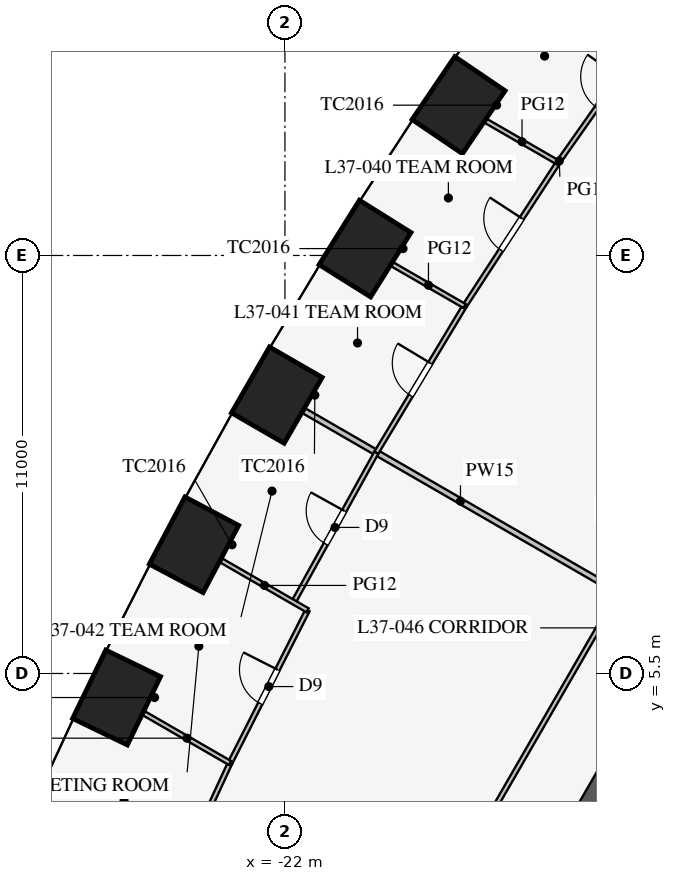
"""IFC4 building model, lengths in metres.
Left out: names, types, materials, properties, quantities, classifications, styles, units other than length and angle.
Written with IfcOpenShell. Run it as: python <this file> out.ifc"""

import sys

from ifc_helpers import new_model, si_unit, direction, frame, frame_2d, origin, origin_2d, place, context, subcontext, project, spatial, rectangle, extrude, element, fill, save


model = new_model("IFC4")
c1 = context("Model", 3, precision=1e-05, world=origin(), true_north=direction((0.0, 1.0)))
c2 = subcontext(c1, "Body", "Model", "MODEL_VIEW")
j1 = project(units=[si_unit("LENGTHUNIT", "METRE"), si_unit("PLANEANGLEUNIT", "RADIAN")], contexts=[c1])
p1 = place(None, origin())
s1 = spatial("IfcSite", under=j1, at=p1, CompositionType="ELEMENT")
p2 = place(p1, origin())
s2 = spatial("IfcBuilding", under=s1, at=p2, CompositionType="ELEMENT")
p3 = place(p2, frame((0.0, 0.0, 161.9)))
s3 = spatial("IfcBuildingStorey", under=s2, at=p3, CompositionType="ELEMENT", Elevation=161.9)
for number, where, z_axis, x_axis in (
    (1, (-17.43, 20.456, 0.0), (0.0, 0.0, 1.0), (-0.561, -0.828, 0.0)),
    (2, (-19.893, 16.681, 0.0), (0.0, 0.0, 1.0), (-0.531, -0.847, 0.0)),
    (3, (-22.213, 12.825, 0.0), (0.0, 0.0, 1.0), (-0.5, -0.866, 0.0)),
    (4, (-24.393, 8.887, 0.0), (0.0, 0.0, 1.0), (-0.468, -0.883, 0.0)),
    (5, (-26.43, 4.867, 0.0), (0.0, 0.0, 1.0), (-0.436, -0.9, 0.0)),
):
    element("IfcColumn", number, at=place(p3, frame(where, z_axis=z_axis, x_axis=x_axis)), inside=s3, PredefinedType="COLUMN", context=c2, shape_type="SweptSolid", body=[
        extrude(rectangle(XDim=2.0, YDim=1.6, at=origin_2d()), origin(), (0.0, 0.0, 1.0), 4.2),
    ])
p4 = place(p3, frame((-5.773, 16.0, 0.0), z_axis=(0.0, 0.0, 1.0), x_axis=(-0.500002442456, -0.866023993627, 0.0)))
e6 = element("IfcWall", 6, at=p4, inside=s3, PredefinedType="SHEAR", context=c2, shape_type="SweptSolid", body=[
    extrude(rectangle(XDim=21.939, YDim=0.8, at=frame_2d((10.97, 0.0))), origin(), (0.0, 0.0, 1.0), 4.2),
])
p5 = place(p4, frame((17.27, 0.0, 0.0)))
e7 = element("IfcOpeningElement", 7, at=p5, cuts=e6, PredefinedType="OPENING", context=c2, shape_type="SweptSolid", body=[
    extrude(rectangle(XDim=1.2, YDim=2.1, at=frame_2d((0.6, 1.05))), frame((0.0, 0.41, 0.0), z_axis=(0.0, -1.0, 0.0), x_axis=(1.0, 0.0, 0.0)), (0.0, 0.0, 1.0), 0.82),
])
p6 = place(p4, frame((3.47, 0.0, 0.0)))
e8 = element("IfcOpeningElement", 8, at=p6, cuts=e6, PredefinedType="OPENING", context=c2, shape_type="SweptSolid", body=[
    extrude(rectangle(XDim=1.2, YDim=2.1, at=frame_2d((0.6, 1.05))), frame((0.0, 0.41, 0.0), z_axis=(0.0, -1.0, 0.0), x_axis=(1.0, 0.0, 0.0)), (0.0, 0.0, 1.0), 0.82),
])
p7 = place(p3, frame((-13.268, 7.66, 0.0), z_axis=(0.0, 0.0, 1.0), x_axis=(-0.866013963754, 0.500019814191, 0.0)))
e9 = element("IfcWall", 9, at=p7, inside=s3, PredefinedType="PARTITIONING", context=c2, shape_type="SweptSolid", body=[
    extrude(rectangle(XDim=9.5, YDim=0.15, at=frame_2d((4.75, 0.0))), origin(), (0.0, 0.0, 1.0), 2.8),
])
p8 = place(p3, frame((-0.016, 30.491, 0.0), z_axis=(0.0, 0.0, 1.0), x_axis=(-0.50000091641, -0.866024874695, 0.0)))
e10 = element("IfcWall", 10, at=p8, inside=s3, PredefinedType="PARTITIONING", context=c2, shape_type="SweptSolid", body=[
    extrude(rectangle(XDim=52.796, YDim=0.12, at=frame_2d((26.398, 0.0))), origin(), (0.0, 0.0, 1.0), 2.9),
])
p9 = place(p8, frame((10.2, 0.0, 0.15)))
e11 = element("IfcOpeningElement", 11, at=p9, cuts=e10, PredefinedType="OPENING", context=c2, shape_type="SweptSolid", body=[
    extrude(rectangle(XDim=1.8, YDim=2.1, at=frame_2d((0.9, 1.05))), frame((0.0, 0.07, 0.0), z_axis=(0.0, -1.0, 0.0), x_axis=(1.0, 0.0, 0.0)), (0.0, 0.0, 1.0), 0.14),
])
p10 = place(p8, frame((40.8, 0.0, 0.15)))
e12 = element("IfcOpeningElement", 12, at=p10, cuts=e10, PredefinedType="OPENING", context=c2, shape_type="SweptSolid", body=[
    extrude(rectangle(XDim=1.8, YDim=2.1, at=frame_2d((0.9, 1.05))), frame((0.0, 0.07, 0.0), z_axis=(0.0, -1.0, 0.0), x_axis=(1.0, 0.0, 0.0)), (0.0, 0.0, 1.0), 0.14),
])
p11 = place(p3, frame((-19.594, 11.312, 0.0), z_axis=(0.0, 0.0, 1.0), x_axis=(-0.484315883017, -0.87489320803, 0.0)))
e13 = element("IfcWall", 13, at=p11, inside=s3, PredefinedType="PARTITIONING", context=c2, shape_type="SweptSolid", body=[
    extrude(rectangle(XDim=4.5, YDim=0.12, at=frame_2d((2.25, 0.0))), origin(), (0.0, 0.0, 1.0), 2.9),
])
p12 = place(p11, frame((1.75, 0.0, 0.15)))
e14 = element("IfcOpeningElement", 14, at=p12, cuts=e13, PredefinedType="OPENING", context=c2, shape_type="SweptSolid", body=[
    extrude(rectangle(XDim=1.0, YDim=2.1, at=frame_2d((0.5, 1.05))), frame((0.0, 0.07, 0.0), z_axis=(0.0, -1.0, 0.0), x_axis=(1.0, 0.0, 0.0)), (0.0, 0.0, 1.0), 0.14),
])
p13 = place(p3, frame((-21.405, 7.162, 0.0), z_axis=(0.0, 0.0, 1.0), x_axis=(-0.452471679136, -0.891778772779, 0.0)))
e15 = element("IfcWall", 15, at=p13, inside=s3, PredefinedType="PARTITIONING", context=c2, shape_type="SweptSolid", body=[
    extrude(rectangle(XDim=4.507, YDim=0.12, at=frame_2d((2.253, 0.0))), origin(), (0.0, 0.0, 1.0), 2.9),
])
p14 = place(p13, frame((1.75, 0.0, 0.15)))
e16 = element("IfcOpeningElement", 16, at=p14, cuts=e15, PredefinedType="OPENING", context=c2, shape_type="SweptSolid", body=[
    extrude(rectangle(XDim=1.0, YDim=2.1, at=frame_2d((0.5, 1.05))), frame((0.0, 0.07, 0.0), z_axis=(0.0, -1.0, 0.0), x_axis=(1.0, 0.0, 0.0)), (0.0, 0.0, 1.0), 0.14),
])
p15 = place(p3, frame((-23.444, 3.143, 0.0), z_axis=(0.0, 0.0, 1.0), x_axis=(-0.419883773418, -0.907577884713, 0.0)))
e17 = element("IfcWall", 17, at=p15, inside=s3, PredefinedType="PARTITIONING", context=c2, shape_type="SweptSolid", body=[
    extrude(rectangle(XDim=4.519, YDim=0.12, at=frame_2d((2.259, 0.0))), origin(), (0.0, 0.0, 1.0), 2.9),
])
p16 = place(p15, frame((1.75, 0.0, 0.15)))
e18 = element("IfcOpeningElement", 18, at=p16, cuts=e17, PredefinedType="OPENING", context=c2, shape_type="SweptSolid", body=[
    extrude(rectangle(XDim=1.0, YDim=2.1, at=frame_2d((0.5, 1.05))), frame((0.0, 0.07, 0.0), z_axis=(0.0, -1.0, 0.0), x_axis=(1.0, 0.0, 0.0)), (0.0, 0.0, 1.0), 0.14),
])
p17 = place(p3, frame((-12.21, 22.638, 0.0), z_axis=(0.0, 0.0, 1.0), x_axis=(-0.575987178736, -0.817458726745, 0.0)))
e19 = element("IfcWall", 19, at=p17, inside=s3, PredefinedType="PARTITIONING", context=c2, shape_type="SweptSolid", body=[
    extrude(rectangle(XDim=4.518, YDim=0.12, at=frame_2d((2.259, 0.0))), origin(), (0.0, 0.0, 1.0), 2.9),
])
p18 = place(p17, frame((1.75, 0.0, 0.15)))
e20 = element("IfcOpeningElement", 20, at=p18, cuts=e19, PredefinedType="OPENING", context=c2, shape_type="SweptSolid", body=[
    extrude(rectangle(XDim=1.0, YDim=2.1, at=frame_2d((0.5, 1.05))), frame((0.0, 0.07, 0.0), z_axis=(0.0, -1.0, 0.0), x_axis=(1.0, 0.0, 0.0)), (0.0, 0.0, 1.0), 0.14),
])
p19 = place(p3, frame((-17.273, 15.169, 0.0), z_axis=(0.0, 0.0, 1.0), x_axis=(-0.515524404457, -0.856874896592, 0.0)))
e21 = element("IfcWall", 21, at=p19, inside=s3, PredefinedType="PARTITIONING", context=c2, shape_type="SweptSolid", body=[
    extrude(rectangle(XDim=4.501, YDim=0.12, at=frame_2d((2.25, 0.0))), origin(), (0.0, 0.0, 1.0), 2.9),
])
p20 = place(p19, frame((1.75, 0.0, 0.15)))
e22 = element("IfcOpeningElement", 22, at=p20, cuts=e21, PredefinedType="OPENING", context=c2, shape_type="SweptSolid", body=[
    extrude(rectangle(XDim=1.0, YDim=2.1, at=frame_2d((0.5, 1.05))), frame((0.0, 0.07, 0.0), z_axis=(0.0, -1.0, 0.0), x_axis=(1.0, 0.0, 0.0)), (0.0, 0.0, 1.0), 0.14),
])
p21 = place(p3, frame((-14.812, 18.944, 0.0), z_axis=(0.0, 0.0, 1.0), x_axis=(-0.546094247499, -0.837723744948, 0.0)))
e23 = element("IfcWall", 23, at=p21, inside=s3, PredefinedType="PARTITIONING", context=c2, shape_type="SweptSolid", body=[
    extrude(rectangle(XDim=4.506, YDim=0.12, at=frame_2d((2.253, 0.0))), origin(), (0.0, 0.0, 1.0), 2.9),
])
p22 = place(p21, frame((1.75, 0.0, 0.15)))
e24 = element("IfcOpeningElement", 24, at=p22, cuts=e23, PredefinedType="OPENING", context=c2, shape_type="SweptSolid", body=[
    extrude(rectangle(XDim=1.0, YDim=2.1, at=frame_2d((0.5, 1.05))), frame((0.0, 0.07, 0.0), z_axis=(0.0, -1.0, 0.0), x_axis=(1.0, 0.0, 0.0)), (0.0, 0.0, 1.0), 0.14),
])
p23 = place(p3, frame((-21.405, 7.162, 0.0), z_axis=(0.0, 0.0, 1.0), x_axis=(-0.866008611403, 0.50002908413, 0.0)))
e25 = element("IfcWall", 25, at=p23, inside=s3, PredefinedType="PARTITIONING", context=c2, shape_type="SweptSolid", body=[
    extrude(rectangle(XDim=2.619, YDim=0.12, at=frame_2d((1.31, 0.0))), origin(), (0.0, 0.0, 1.0), 2.8),
])
p24 = place(p3, frame((-23.444, 3.143, 0.0), z_axis=(0.0, 0.0, 1.0), x_axis=(-0.866011491631, 0.500024095782, 0.0)))
e26 = element("IfcWall", 26, at=p24, inside=s3, PredefinedType="PARTITIONING", context=c2, shape_type="SweptSolid", body=[
    extrude(rectangle(XDim=2.615, YDim=0.12, at=frame_2d((1.308, 0.0))), origin(), (0.0, 0.0, 1.0), 2.9),
])
p25 = place(p3, frame((-17.273, 15.169, 0.0), z_axis=(0.0, 0.0, 1.0), x_axis=(-0.866050320478, 0.499956840538, 0.0)))
e27 = element("IfcWall", 27, at=p25, inside=s3, PredefinedType="PARTITIONING", context=c2, shape_type="SweptSolid", body=[
    extrude(rectangle(XDim=2.194, YDim=0.12, at=frame_2d((1.097, 0.0))), origin(), (0.0, 0.0, 1.0), 2.8),
])
p26 = place(p3, frame((-14.812, 18.944, 0.0), z_axis=(0.0, 0.0, 1.0), x_axis=(-0.866005567398, 0.500034356056, 0.0)))
e28 = element("IfcWall", 28, at=p26, inside=s3, PredefinedType="PARTITIONING", context=c2, shape_type="SweptSolid", body=[
    extrude(rectangle(XDim=2.191, YDim=0.12, at=frame_2d((1.095, 0.0))), origin(), (0.0, 0.0, 1.0), 2.9),
])
p27 = place(p18, frame((1.0, 0.0, 0.0), z_axis=(0.0, 0.0, 1.0), x_axis=(-1.0, 0.0, 0.0)))
e29 = element("IfcDoor", 29, at=p27, inside=s3, OperationType="SINGLE_SWING_RIGHT", PredefinedType="DOOR", context=c2, shape_type="SweptSolid", body=[
    extrude(rectangle(XDim=1.0, YDim=2.1, at=frame_2d((0.5, 1.05))), frame((0.0, 0.025, 0.0), z_axis=(0.0, -1.0, 0.0), x_axis=(1.0, 0.0, 0.0)), (0.0, 0.0, 1.0), 0.05),
])
fill(e20, e29)
p28 = place(p22, frame((1.0, 0.0, 0.0), z_axis=(0.0, 0.0, 1.0), x_axis=(-1.0, 0.0, 0.0)))
e30 = element("IfcDoor", 30, at=p28, inside=s3, OperationType="SINGLE_SWING_RIGHT", PredefinedType="DOOR", context=c2, shape_type="SweptSolid", body=[
    extrude(rectangle(XDim=1.0, YDim=2.1, at=frame_2d((0.5, 1.05))), frame((0.0, 0.025, 0.0), z_axis=(0.0, -1.0, 0.0), x_axis=(1.0, 0.0, 0.0)), (0.0, 0.0, 1.0), 0.05),
])
fill(e24, e30)
p29 = place(p20, frame((1.0, 0.0, 0.0), z_axis=(0.0, 0.0, 1.0), x_axis=(-1.0, 0.0, 0.0)))
e31 = element("IfcDoor", 31, at=p29, inside=s3, OperationType="SINGLE_SWING_RIGHT", PredefinedType="DOOR", context=c2, shape_type="SweptSolid", body=[
    extrude(rectangle(XDim=1.0, YDim=2.1, at=frame_2d((0.5, 1.05))), frame((0.0, 0.025, 0.0), z_axis=(0.0, -1.0, 0.0), x_axis=(1.0, 0.0, 0.0)), (0.0, 0.0, 1.0), 0.05),
])
fill(e22, e31)
p30 = place(p12, frame((1.0, 0.0, 0.0), z_axis=(0.0, 0.0, 1.0), x_axis=(-1.0, 0.0, 0.0)))
e32 = element("IfcDoor", 32, at=p30, inside=s3, OperationType="SINGLE_SWING_RIGHT", PredefinedType="DOOR", context=c2, shape_type="SweptSolid", body=[
    extrude(rectangle(XDim=1.0, YDim=2.1, at=frame_2d((0.5, 1.05))), frame((0.0, 0.025, 0.0), z_axis=(0.0, -1.0, 0.0), x_axis=(1.0, 0.0, 0.0)), (0.0, 0.0, 1.0), 0.05),
])
fill(e14, e32)
p31 = place(p14, frame((1.0, 0.0, 0.0), z_axis=(0.0, 0.0, 1.0), x_axis=(-1.0, 0.0, 0.0)))
e33 = element("IfcDoor", 33, at=p31, inside=s3, OperationType="SINGLE_SWING_RIGHT", PredefinedType="DOOR", context=c2, shape_type="SweptSolid", body=[
    extrude(rectangle(XDim=1.0, YDim=2.1, at=frame_2d((0.5, 1.05))), frame((0.0, 0.025, 0.0), z_axis=(0.0, -1.0, 0.0), x_axis=(1.0, 0.0, 0.0)), (0.0, 0.0, 1.0), 0.05),
])
fill(e16, e33)
save(model, sys.argv[1])
